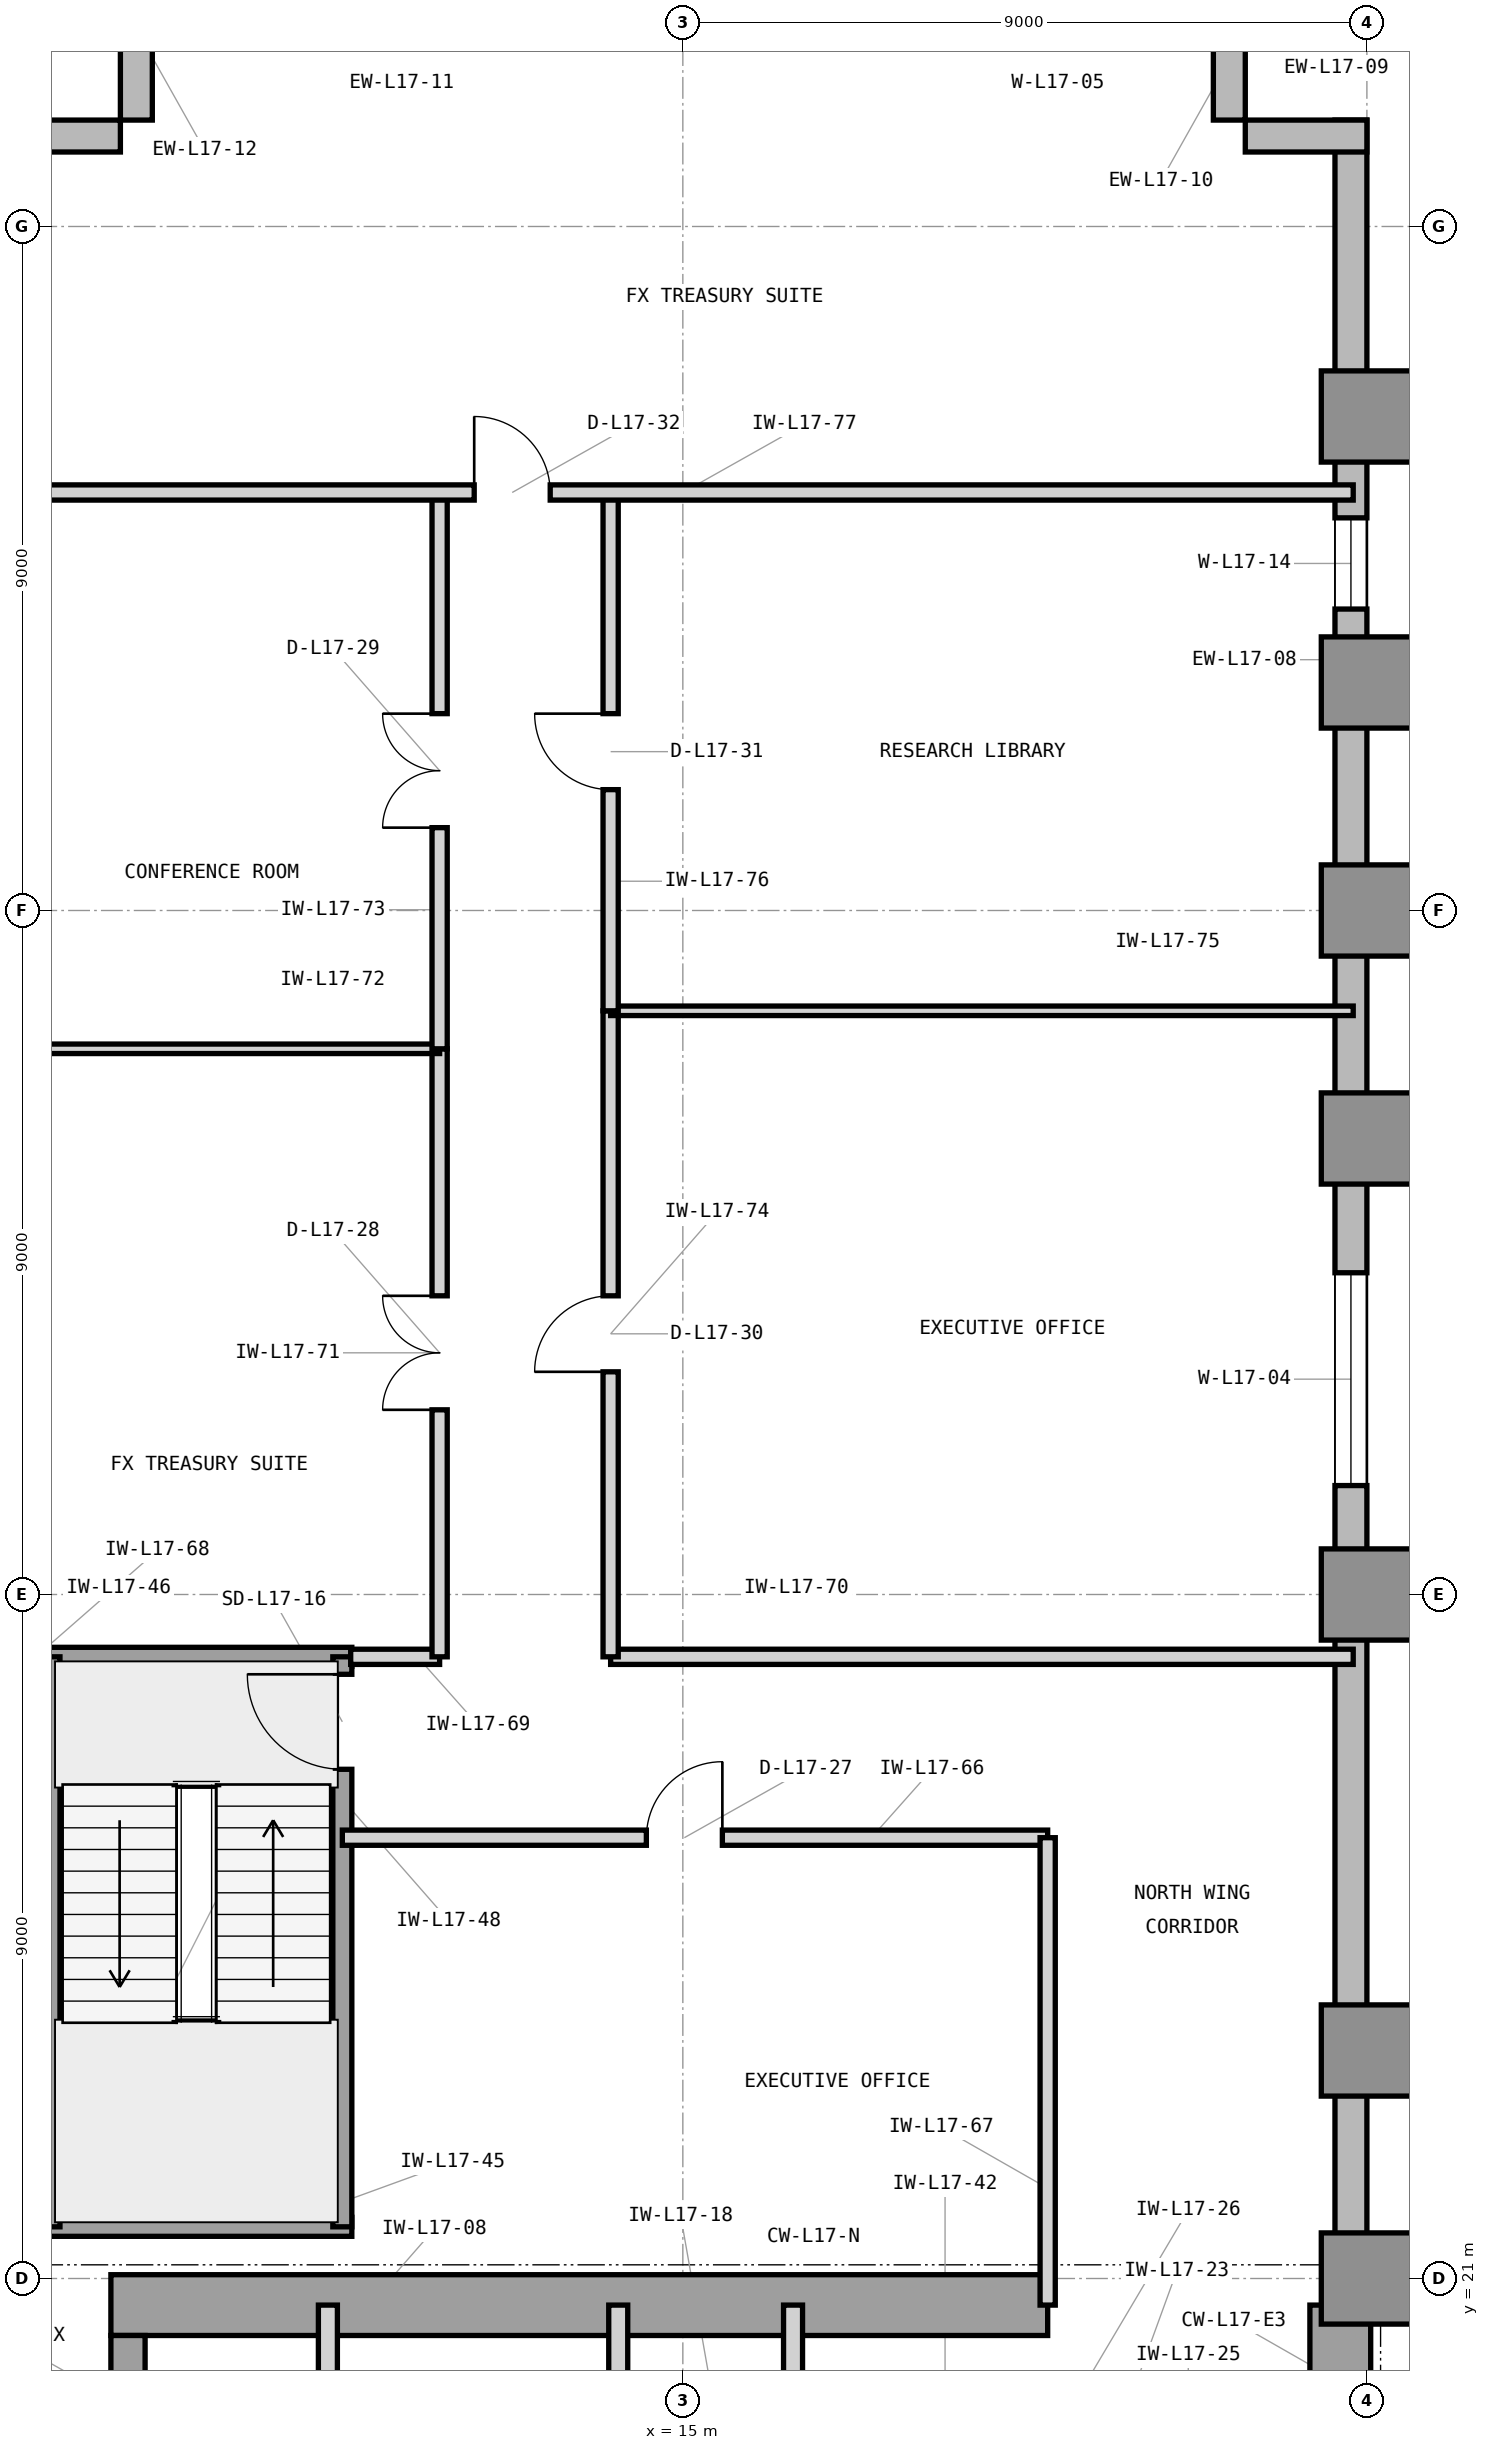
"""IFC4 building model, lengths in metres.
Left out: names, types, materials, properties, quantities, classifications, styles, units other than length and angle.
Written with IfcOpenShell. Run it as: python <this file> out.ifc"""

import sys

from ifc_helpers import new_model, si_unit, direction, frame, frame_2d, origin, origin_2d, place, context, subcontext, project, spatial, rectangle, extrude, element, fill, save


model = new_model("IFC4")
c1 = context("Model", 3, precision=1e-05, world=origin(), true_north=direction((0.0, 1.0)))
c2 = subcontext(c1, "Body", "Model", "MODEL_VIEW")
j1 = project(units=[si_unit("LENGTHUNIT", "METRE"), si_unit("PLANEANGLEUNIT", "RADIAN")], contexts=[c1])
p1 = place(None, origin())
s1 = spatial("IfcSite", under=j1, at=p1, CompositionType="ELEMENT")
p2 = place(p1, origin())
s2 = spatial("IfcBuilding", under=s1, at=p2, CompositionType="ELEMENT")
p3 = place(p2, frame((0.0, 0.0, 76.2)))
s3 = spatial("IfcBuildingStorey", under=s2, at=p3, CompositionType="ELEMENT", Elevation=76.2)
p4 = place(p3, frame((7.475, 20.65, 0.0), z_axis=(0.0, 0.0, 1.0), x_axis=(1.0, 0.0, 0.0)))
e1 = element("IfcWall", 1, at=p4, inside=s3, PredefinedType="SHEAR", context=c2, shape_type="SweptSolid", body=[
    extrude(rectangle(XDim=12.325, YDim=0.8, at=frame_2d((6.163, 0.0))), origin(), (0.0, 0.0, 1.0), 4.2),
])
p5 = place(p3, frame((23.65, 16.6, 0.0), z_axis=(0.0, 0.0, 1.0), x_axis=(0.0, 1.0, 0.0)))
e2 = element("IfcWall", 2, at=p5, inside=s3, PredefinedType="SHEAR", context=c2, shape_type="SweptSolid", body=[
    extrude(rectangle(XDim=4.05, YDim=0.8, at=frame_2d((2.025, 0.0))), origin(), (0.0, 0.0, 1.0), 4.2),
])
p6 = place(p3, frame((7.7, 19.575, 0.0), z_axis=(0.0, 0.0, 1.0), x_axis=(0.0, 1.0, 0.0)))
e3 = element("IfcWall", 3, at=p6, inside=s3, PredefinedType="SHEAR", context=c2, shape_type="SweptSolid", body=[
    extrude(rectangle(XDim=0.675, YDim=0.45, at=frame_2d((0.337, 0.0))), origin(), (0.0, 0.0, 1.0), 4.2),
])
for number, where, z_axis, x_axis in (
    (4, (24.0, 21.0, 0.0), (0.0, 0.0, 1.0), (1.0, 0.0, 0.0)),
    (5, (24.0, 24.0, 0.0), (0.0, 0.0, 1.0), (1.0, 0.0, 0.0)),
    (6, (24.0, 30.0, 0.0), (0.0, 0.0, 1.0), (1.0, 0.0, 0.0)),
    (7, (24.0, 36.0, 0.0), (0.0, 0.0, 1.0), (1.0, 0.0, 0.0)),
    (8, (24.0, 39.0, 0.0), (0.0, 0.0, 1.0), (1.0, 0.0, 0.0)),
    (9, (24.0, 42.0, 0.0), (0.0, 0.0, 1.0), (1.0, 0.0, 0.0)),
    (10, (24.0, 45.5, 0.0), (0.0, 0.0, 1.0), (1.0, 0.0, 0.0)),
):
    element("IfcColumn", number, at=place(p3, frame(where, z_axis=z_axis, x_axis=x_axis)), inside=s3, PredefinedType="COLUMN", context=c2, shape_type="SweptSolid", body=[
        extrude(rectangle(XDim=1.2, YDim=1.2, at=origin_2d()), origin(), (0.0, 0.0, 1.0), 4.2),
    ])
p7 = place(p3, frame((23.79, 21.0, 0.0), z_axis=(0.0, 0.0, 1.0), x_axis=(0.0, 1.0, 0.0)))
e11 = element("IfcWall", 11, at=p7, inside=s3, PredefinedType="STANDARD", context=c2, shape_type="SweptSolid", body=[
    extrude(rectangle(XDim=28.4, YDim=0.42, at=frame_2d((14.2, 0.0))), origin(), (0.0, 0.0, 1.0), 3.98),
])
p8 = place(p7, frame((10.433, 0.0, 0.85)))
e12 = element("IfcOpeningElement", 12, at=p8, cuts=e11, PredefinedType="OPENING", context=c2, shape_type="SweptSolid", body=[
    extrude(rectangle(XDim=2.8, YDim=2.45, at=frame_2d((1.4, 1.225))), frame((0.0, 0.22, 0.0), z_axis=(0.0, -1.0, 0.0), x_axis=(1.0, 0.0, 0.0)), (0.0, 0.0, 1.0), 0.44),
])
p9 = place(p7, frame((21.966, 0.0, 0.85)))
e13 = element("IfcOpeningElement", 13, at=p9, cuts=e11, PredefinedType="OPENING", context=c2, shape_type="SweptSolid", body=[
    extrude(rectangle(XDim=1.2, YDim=2.45, at=frame_2d((0.6, 1.225))), frame((0.0, 0.22, 0.0), z_axis=(0.0, -1.0, 0.0), x_axis=(1.0, 0.0, 0.0)), (0.0, 0.0, 1.0), 0.44),
])
for number, where, z_axis, x_axis in (
    (14, (24.0, 49.19, 0.0), (0.0, 0.0, 1.0), (-1.0, 0.0, 0.0)),
    (15, (22.19, 49.4, 0.0), (0.0, 0.0, 1.0), (0.0, 1.0, 0.0)),
    (16, (7.81, 51.0, 0.0), (0.0, 0.0, 1.0), (0.0, -1.0, 0.0)),
    (17, (7.6, 49.19, 0.0), (0.0, 0.0, 1.0), (-1.0, 0.0, 0.0)),
):
    element("IfcWall", number, at=place(p3, frame(where, z_axis=z_axis, x_axis=x_axis)), inside=s3, PredefinedType="STANDARD", context=c2, shape_type="SweptSolid", body=[
        extrude(rectangle(XDim=1.6, YDim=0.42, at=frame_2d((0.8, 0.0))), origin(), (0.0, 0.0, 1.0), 3.98),
    ])
p10 = place(p3, frame((10.33, 19.45, 0.0), z_axis=(0.0, 0.0, 1.0), x_axis=(0.0, 1.0, 0.0)))
e18 = element("IfcWall", 18, at=p10, inside=s3, PredefinedType="PARTITIONING", context=c2, shape_type="SweptSolid", body=[
    extrude(rectangle(XDim=1.2, YDim=0.25, at=frame_2d((0.6, 0.0))), origin(), (0.0, 0.0, 1.0), 3.114),
])
for number, where, z_axis, x_axis in (
    (19, (14.15, 16.7, 0.0), (0.0, 0.0, 1.0), (0.0, 1.0, 0.0)),
    (20, (16.45, 16.7, 0.0), (0.0, 0.0, 1.0), (0.0, 1.0, 0.0)),
):
    element("IfcWall", number, at=place(p3, frame(where, z_axis=z_axis, x_axis=x_axis)), inside=s3, PredefinedType="PARTITIONING", context=c2, shape_type="SweptSolid", body=[
        extrude(rectangle(XDim=3.95, YDim=0.25, at=frame_2d((1.975, 0.0))), origin(), (0.0, 0.0, 1.0), 3.97),
    ])
for number, where, z_axis, x_axis in (
    (21, (6.555, 21.68, 0.0), (0.0, 0.0, 1.0), (1.0, 0.0, 0.0)),
    (22, (6.555, 29.18, 0.0), (0.0, 0.0, 1.0), (1.0, 0.0, 0.0)),
):
    element("IfcWall", number, at=place(p3, frame(where, z_axis=z_axis, x_axis=x_axis)), inside=s3, PredefinedType="SHEAR", context=c2, shape_type="SweptSolid", body=[
        extrude(rectangle(XDim=4.09, YDim=0.25, at=frame_2d((2.045, 0.0))), origin(), (0.0, 0.0, 1.0), 4.2),
    ])
p11 = place(p3, frame((6.68, 21.68, 0.0), z_axis=(0.0, 0.0, 1.0), x_axis=(0.0, 1.0, 0.0)))
e23 = element("IfcWall", 23, at=p11, inside=s3, PredefinedType="SHEAR", context=c2, shape_type="SweptSolid", body=[
    extrude(rectangle(XDim=7.5, YDim=0.25, at=frame_2d((3.75, 0.0))), origin(), (0.0, 0.0, 1.0), 4.2),
])
p12 = place(p3, frame((10.52, 21.68, 0.0), z_axis=(0.0, 0.0, 1.0), x_axis=(0.0, 1.0, 0.0)))
e24 = element("IfcWall", 24, at=p12, inside=s3, PredefinedType="SHEAR", context=c2, shape_type="SweptSolid", body=[
    extrude(rectangle(XDim=7.5, YDim=0.25, at=frame_2d((3.75, 0.0))), origin(), (0.0, 0.0, 1.0), 4.2),
])
p13 = place(p12, frame((6.02, 0.0, 0.0)))
e25 = element("IfcOpeningElement", 25, at=p13, cuts=e24, PredefinedType="OPENING", context=c2, shape_type="SweptSolid", body=[
    extrude(rectangle(XDim=1.25, YDim=2.2, at=frame_2d((0.625, 1.1))), frame((0.0, 0.135, 0.0), z_axis=(0.0, -1.0, 0.0), x_axis=(1.0, 0.0, 0.0)), (0.0, 0.0, 1.0), 0.27),
])
p14 = place(p3, frame((10.52, 26.8, 0.0), z_axis=(0.0, 0.0, 1.0), x_axis=(1.0, 0.0, 0.0)))
e26 = element("IfcWall", 26, at=p14, inside=s3, PredefinedType="PARTITIONING", context=c2, shape_type="SweptSolid", body=[
    extrude(rectangle(XDim=9.28, YDim=0.2, at=frame_2d((4.64, 0.0))), origin(), (0.0, 0.0, 1.0), 3.97),
])
p15 = place(p14, frame((4.0, 0.0, 0.0)))
e27 = element("IfcOpeningElement", 27, at=p15, cuts=e26, PredefinedType="OPENING", context=c2, shape_type="SweptSolid", body=[
    extrude(rectangle(XDim=1.0, YDim=2.15, at=frame_2d((0.5, 1.075))), frame((0.0, 0.11, 0.0), z_axis=(0.0, -1.0, 0.0), x_axis=(1.0, 0.0, 0.0)), (0.0, 0.0, 1.0), 0.22),
])
p16 = place(p3, frame((19.8, 20.65, 0.0), z_axis=(0.0, 0.0, 1.0), x_axis=(0.0, 1.0, 0.0)))
e28 = element("IfcWall", 28, at=p16, inside=s3, PredefinedType="PARTITIONING", context=c2, shape_type="SweptSolid", body=[
    extrude(rectangle(XDim=6.15, YDim=0.2, at=frame_2d((3.075, 0.0))), origin(), (0.0, 0.0, 1.0), 3.97),
])
p17 = place(p3, frame((10.63, 29.18, 0.0), z_axis=(0.0, 0.0, 1.0), x_axis=(1.0, 0.0, 0.0)))
e29 = element("IfcWall", 29, at=p17, inside=s3, PredefinedType="PARTITIONING", context=c2, shape_type="SweptSolid", body=[
    extrude(rectangle(XDim=1.17, YDim=0.2, at=frame_2d((0.585, 0.0))), origin(), (0.0, 0.0, 1.0), 3.97),
])
p18 = place(p3, frame((14.05, 29.18, 0.0), z_axis=(0.0, 0.0, 1.0), x_axis=(1.0, 0.0, 0.0)))
e30 = element("IfcWall", 30, at=p18, inside=s3, PredefinedType="PARTITIONING", context=c2, shape_type="SweptSolid", body=[
    extrude(rectangle(XDim=9.77, YDim=0.2, at=frame_2d((4.885, 0.0))), origin(), (0.0, 0.0, 1.0), 3.97),
])
p19 = place(p3, frame((11.8, 29.18, 0.0), z_axis=(0.0, 0.0, 1.0), x_axis=(0.0, 1.0, 0.0)))
e31 = element("IfcWall", 31, at=p19, inside=s3, PredefinedType="PARTITIONING", context=c2, shape_type="SweptSolid", body=[
    extrude(rectangle(XDim=8.0, YDim=0.2, at=frame_2d((4.0, 0.0))), origin(), (0.0, 0.0, 1.0), 3.97),
])
p20 = place(p19, frame((3.25, 0.0, 0.0)))
e32 = element("IfcOpeningElement", 32, at=p20, cuts=e31, PredefinedType="OPENING", context=c2, shape_type="SweptSolid", body=[
    extrude(rectangle(XDim=1.5, YDim=2.3, at=frame_2d((0.75, 1.15))), frame((0.0, 0.11, 0.0), z_axis=(0.0, -1.0, 0.0), x_axis=(1.0, 0.0, 0.0)), (0.0, 0.0, 1.0), 0.22),
])
p21 = place(p3, frame((6.18, 37.18, 0.0), z_axis=(0.0, 0.0, 1.0), x_axis=(1.0, 0.0, 0.0)))
e33 = element("IfcWall", 33, at=p21, inside=s3, PredefinedType="PARTITIONING", context=c2, shape_type="SweptSolid", body=[
    extrude(rectangle(XDim=5.62, YDim=0.125, at=frame_2d((2.81, 0.0))), origin(), (0.0, 0.0, 1.0), 3.97),
])
p22 = place(p3, frame((11.8, 37.18, 0.0), z_axis=(0.0, 0.0, 1.0), x_axis=(0.0, 1.0, 0.0)))
e34 = element("IfcWall", 34, at=p22, inside=s3, PredefinedType="PARTITIONING", context=c2, shape_type="SweptSolid", body=[
    extrude(rectangle(XDim=7.32, YDim=0.2, at=frame_2d((3.66, 0.0))), origin(), (0.0, 0.0, 1.0), 3.97),
])
p23 = place(p22, frame((2.91, 0.0, 0.0)))
e35 = element("IfcOpeningElement", 35, at=p23, cuts=e34, PredefinedType="OPENING", context=c2, shape_type="SweptSolid", body=[
    extrude(rectangle(XDim=1.5, YDim=2.3, at=frame_2d((0.75, 1.15))), frame((0.0, 0.11, 0.0), z_axis=(0.0, -1.0, 0.0), x_axis=(1.0, 0.0, 0.0)), (0.0, 0.0, 1.0), 0.22),
])
p24 = place(p3, frame((14.05, 29.18, 0.0), z_axis=(0.0, 0.0, 1.0), x_axis=(0.0, 1.0, 0.0)))
e36 = element("IfcWall", 36, at=p24, inside=s3, PredefinedType="PARTITIONING", context=c2, shape_type="SweptSolid", body=[
    extrude(rectangle(XDim=8.5, YDim=0.2, at=frame_2d((4.25, 0.0))), origin(), (0.0, 0.0, 1.0), 3.97),
])
p25 = place(p24, frame((3.75, 0.0, 0.0)))
e37 = element("IfcOpeningElement", 37, at=p25, cuts=e36, PredefinedType="OPENING", context=c2, shape_type="SweptSolid", body=[
    extrude(rectangle(XDim=1.0, YDim=2.15, at=frame_2d((0.5, 1.075))), frame((0.0, 0.11, 0.0), z_axis=(0.0, -1.0, 0.0), x_axis=(1.0, 0.0, 0.0)), (0.0, 0.0, 1.0), 0.22),
])
p26 = place(p3, frame((14.05, 37.68, 0.0), z_axis=(0.0, 0.0, 1.0), x_axis=(1.0, 0.0, 0.0)))
e38 = element("IfcWall", 38, at=p26, inside=s3, PredefinedType="PARTITIONING", context=c2, shape_type="SweptSolid", body=[
    extrude(rectangle(XDim=9.77, YDim=0.125, at=frame_2d((4.885, 0.0))), origin(), (0.0, 0.0, 1.0), 3.97),
])
p27 = place(p3, frame((14.05, 37.68, 0.0), z_axis=(0.0, 0.0, 1.0), x_axis=(0.0, 1.0, 0.0)))
e39 = element("IfcWall", 39, at=p27, inside=s3, PredefinedType="PARTITIONING", context=c2, shape_type="SweptSolid", body=[
    extrude(rectangle(XDim=6.82, YDim=0.2, at=frame_2d((3.41, 0.0))), origin(), (0.0, 0.0, 1.0), 3.97),
])
p28 = place(p27, frame((2.91, 0.0, 0.0)))
e40 = element("IfcOpeningElement", 40, at=p28, cuts=e39, PredefinedType="OPENING", context=c2, shape_type="SweptSolid", body=[
    extrude(rectangle(XDim=1.0, YDim=2.15, at=frame_2d((0.5, 1.075))), frame((0.0, 0.11, 0.0), z_axis=(0.0, -1.0, 0.0), x_axis=(1.0, 0.0, 0.0)), (0.0, 0.0, 1.0), 0.22),
])
p29 = place(p3, frame((6.18, 44.5, 0.0), z_axis=(0.0, 0.0, 1.0), x_axis=(1.0, 0.0, 0.0)))
e41 = element("IfcWall", 41, at=p29, inside=s3, PredefinedType="PARTITIONING", context=c2, shape_type="SweptSolid", body=[
    extrude(rectangle(XDim=17.64, YDim=0.2, at=frame_2d((8.82, 0.0))), origin(), (0.0, 0.0, 1.0), 3.97),
])
p30 = place(p29, frame((6.075, 0.0, 0.0)))
e42 = element("IfcOpeningElement", 42, at=p30, cuts=e41, PredefinedType="OPENING", context=c2, shape_type="SweptSolid", body=[
    extrude(rectangle(XDim=1.0, YDim=2.15, at=frame_2d((0.5, 1.075))), frame((0.0, 0.11, 0.0), z_axis=(0.0, -1.0, 0.0), x_axis=(1.0, 0.0, 0.0)), (0.0, 0.0, 1.0), 0.22),
])
p31 = place(p8, origin())
e43 = element("IfcWindow", 43, at=p31, inside=s3, PartitioningType="SINGLE_PANEL", PredefinedType="WINDOW", context=c2, shape_type="SweptSolid", body=[
    extrude(rectangle(XDim=2.8, YDim=2.45, at=frame_2d((1.4, 1.225))), frame((0.0, 0.11, 0.0), z_axis=(0.0, -1.0, 0.0), x_axis=(1.0, 0.0, 0.0)), (0.0, 0.0, 1.0), 0.06),
])
fill(e12, e43)
p32 = place(p13, origin())
e44 = element("IfcDoor", 44, at=p32, inside=s3, OperationType="SINGLE_SWING_RIGHT", PredefinedType="DOOR", context=c2, shape_type="SweptSolid", body=[
    extrude(rectangle(XDim=1.25, YDim=2.2, at=frame_2d((0.625, 1.1))), frame((0.0, 0.025, 0.0), z_axis=(0.0, -1.0, 0.0), x_axis=(1.0, 0.0, 0.0)), (0.0, 0.0, 1.0), 0.05),
])
fill(e25, e44)
p33 = place(p15, origin())
e45 = element("IfcDoor", 45, at=p33, inside=s3, OperationType="SINGLE_SWING_RIGHT", PredefinedType="DOOR", context=c2, shape_type="SweptSolid", body=[
    extrude(rectangle(XDim=1.0, YDim=2.15, at=frame_2d((0.5, 1.075))), frame((0.0, 0.025, 0.0), z_axis=(0.0, -1.0, 0.0), x_axis=(1.0, 0.0, 0.0)), (0.0, 0.0, 1.0), 0.05),
])
fill(e27, e45)
p34 = place(p20, origin())
e46 = element("IfcDoor", 46, at=p34, inside=s3, OperationType="DOUBLE_DOOR_SINGLE_SWING", PredefinedType="DOOR", context=c2, shape_type="SweptSolid", body=[
    extrude(rectangle(XDim=1.5, YDim=2.3, at=frame_2d((0.75, 1.15))), frame((0.0, 0.025, 0.0), z_axis=(0.0, -1.0, 0.0), x_axis=(1.0, 0.0, 0.0)), (0.0, 0.0, 1.0), 0.05),
])
fill(e32, e46)
p35 = place(p23, origin())
e47 = element("IfcDoor", 47, at=p35, inside=s3, OperationType="DOUBLE_DOOR_SINGLE_SWING", PredefinedType="DOOR", context=c2, shape_type="SweptSolid", body=[
    extrude(rectangle(XDim=1.5, YDim=2.3, at=frame_2d((0.75, 1.15))), frame((0.0, 0.025, 0.0), z_axis=(0.0, -1.0, 0.0), x_axis=(1.0, 0.0, 0.0)), (0.0, 0.0, 1.0), 0.05),
])
fill(e35, e47)
p36 = place(p25, origin())
e48 = element("IfcDoor", 48, at=p36, inside=s3, OperationType="SINGLE_SWING_LEFT", PredefinedType="DOOR", context=c2, shape_type="SweptSolid", body=[
    extrude(rectangle(XDim=1.0, YDim=2.15, at=frame_2d((0.5, 1.075))), frame((0.0, 0.025, 0.0), z_axis=(0.0, -1.0, 0.0), x_axis=(1.0, 0.0, 0.0)), (0.0, 0.0, 1.0), 0.05),
])
fill(e37, e48)
p37 = place(p28, origin())
e49 = element("IfcDoor", 49, at=p37, inside=s3, OperationType="SINGLE_SWING_RIGHT", PredefinedType="DOOR", context=c2, shape_type="SweptSolid", body=[
    extrude(rectangle(XDim=1.0, YDim=2.15, at=frame_2d((0.5, 1.075))), frame((0.0, 0.025, 0.0), z_axis=(0.0, -1.0, 0.0), x_axis=(1.0, 0.0, 0.0)), (0.0, 0.0, 1.0), 0.05),
])
fill(e40, e49)
p38 = place(p30, origin())
e50 = element("IfcDoor", 50, at=p38, inside=s3, OperationType="SINGLE_SWING_LEFT", PredefinedType="DOOR", context=c2, shape_type="SweptSolid", body=[
    extrude(rectangle(XDim=1.0, YDim=2.15, at=frame_2d((0.5, 1.075))), frame((0.0, 0.025, 0.0), z_axis=(0.0, -1.0, 0.0), x_axis=(1.0, 0.0, 0.0)), (0.0, 0.0, 1.0), 0.05),
])
fill(e42, e50)
p39 = place(p9, origin())
e51 = element("IfcWindow", 51, at=p39, inside=s3, PartitioningType="SINGLE_PANEL", PredefinedType="WINDOW", context=c2, shape_type="SweptSolid", body=[
    extrude(rectangle(XDim=1.2, YDim=2.45, at=frame_2d((0.6, 1.225))), frame((0.0, 0.11, 0.0), z_axis=(0.0, -1.0, 0.0), x_axis=(1.0, 0.0, 0.0)), (0.0, 0.0, 1.0), 0.06),
])
fill(e13, e51)
save(model, sys.argv[1])
